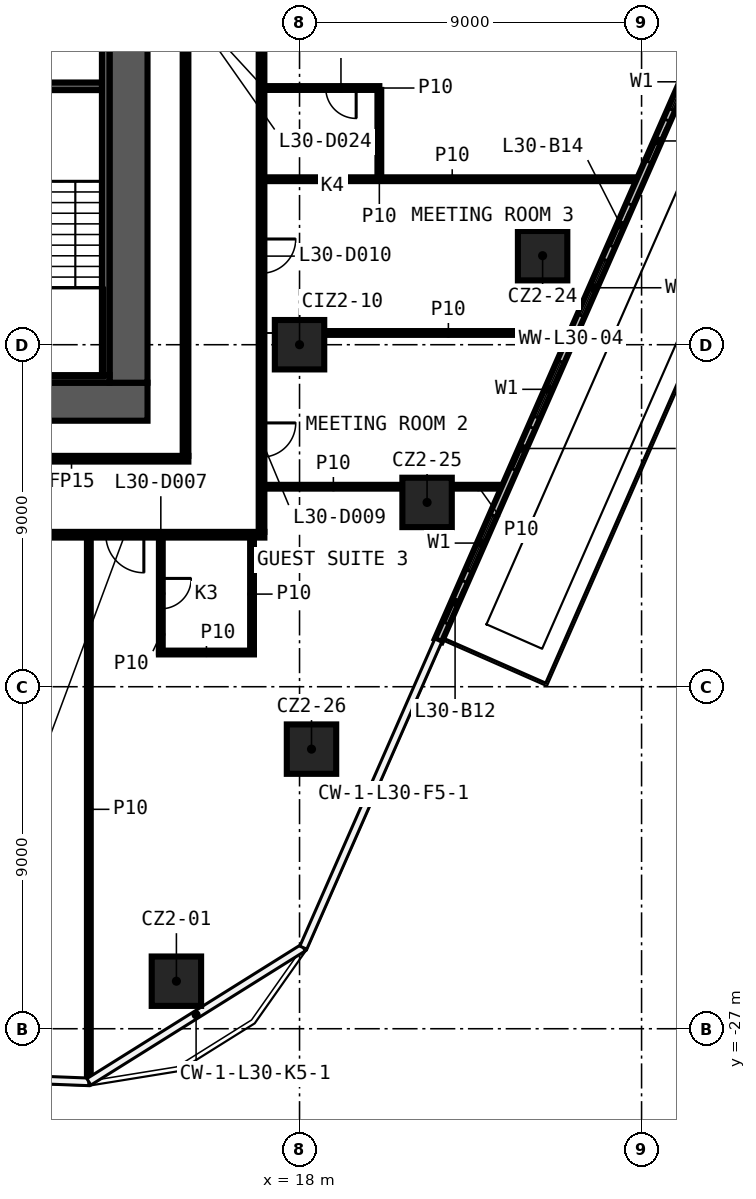
"""IFC4 building model, lengths in metres.
Left out: names, types, materials, properties, quantities, classifications, styles, units other than length and angle.
Written with IfcOpenShell. Run it as: python <this file> out.ifc"""

import sys

from ifc_helpers import new_model, si_unit, direction, frame, frame_2d, origin, origin_2d, place, context, subcontext, project, spatial, rectangle, extrude, element, fill, save


model = new_model("IFC4")
c1 = context("Model", 3, precision=1e-05, world=origin(), true_north=direction((0.0, 1.0)))
c2 = subcontext(c1, "Body", "Model", "MODEL_VIEW")
j1 = project(units=[si_unit("LENGTHUNIT", "METRE"), si_unit("PLANEANGLEUNIT", "RADIAN")], contexts=[c1])
p1 = place(None, origin())
s1 = spatial("IfcSite", under=j1, at=p1, CompositionType="ELEMENT")
p2 = place(p1, origin())
s2 = spatial("IfcBuilding", under=s1, at=p2, CompositionType="ELEMENT")
p3 = place(p2, frame((0.0, 0.0, 135.9)))
s3 = spatial("IfcBuildingStorey", under=s2, at=p3, CompositionType="ELEMENT", Elevation=135.9)
for number, where, z_axis, x_axis in (
    (1, (14.76, -25.749, 0.0), (0.0, 0.0, 1.0), (1.0, 0.0, 0.0)),
    (2, (24.396, -6.657, 0.0), (0.0, 0.0, 1.0), (1.0, 0.0, 0.0)),
    (3, (21.356, -13.15, 0.0), (0.0, 0.0, 1.0), (1.0, 0.0, 0.0)),
    (4, (18.315, -19.642, 0.0), (0.0, 0.0, 1.0), (1.0, 0.0, 0.0)),
    (5, (18.0, -9.0, 0.0), (0.0, 0.0, 1.0), (1.0, 0.0, 0.0)),
):
    element("IfcColumn", number, at=place(p3, frame(where, z_axis=z_axis, x_axis=x_axis)), inside=s3, PredefinedType="COLUMN", context=c2, shape_type="SweptSolid", body=[
        extrude(rectangle(XDim=1.3, YDim=1.3, at=origin_2d()), origin(), (0.0, 0.0, 1.0), 3.3),
    ])
p4 = place(p3, frame((14.3, -17.1, 0.0), z_axis=(0.0, 0.0, 1.0), x_axis=(1.0, 0.0, 0.0)))
e6 = element("IfcWall", 6, at=p4, inside=s3, PredefinedType="PARTITIONING", context=c2, shape_type="SweptSolid", body=[
    extrude(rectangle(XDim=2.5, YDim=0.1, at=frame_2d((1.25, 0.0))), origin(), (0.0, 0.0, 1.0), 3.3),
])
p5 = place(p3, frame((17.075, -14.0, 0.0), z_axis=(0.0, 0.0, 1.0), x_axis=(-1.0, 0.0, 0.0)))
e7 = element("IfcWall", 7, at=p5, inside=s3, PredefinedType="PARTITIONING", context=c2, shape_type="SweptSolid", body=[
    extrude(rectangle(XDim=34.15, YDim=0.15, at=frame_2d((17.075, 0.0))), origin(), (0.0, 0.0, 1.0), 3.3),
])
p6 = place(p5, frame((32.046, 0.0, 0.0)))
e8 = element("IfcOpeningElement", 8, at=p6, cuts=e7, PredefinedType="OPENING", context=c2, shape_type="SweptSolid", body=[
    extrude(rectangle(XDim=0.9, YDim=2.1, at=frame_2d((0.45, 1.05))), frame((0.0, 0.085, 0.0), z_axis=(0.0, -1.0, 0.0), x_axis=(1.0, 0.0, 0.0)), (0.0, 0.0, 1.0), 0.17),
])
p7 = place(p5, frame((24.32, 0.0, 0.0)))
e9 = element("IfcOpeningElement", 9, at=p7, cuts=e7, PredefinedType="OPENING", context=c2, shape_type="SweptSolid", body=[
    extrude(rectangle(XDim=1.0, YDim=2.1, at=frame_2d((0.5, 1.05))), frame((0.0, 0.085, 0.0), z_axis=(0.0, -1.0, 0.0), x_axis=(1.0, 0.0, 0.0)), (0.0, 0.0, 1.0), 0.17),
])
p8 = place(p5, frame((10.847, 0.0, 0.0)))
e10 = element("IfcOpeningElement", 10, at=p8, cuts=e7, PredefinedType="OPENING", context=c2, shape_type="SweptSolid", body=[
    extrude(rectangle(XDim=1.0, YDim=2.1, at=frame_2d((0.5, 1.05))), frame((0.0, 0.085, 0.0), z_axis=(0.0, -1.0, 0.0), x_axis=(1.0, 0.0, 0.0)), (0.0, 0.0, 1.0), 0.17),
])
p9 = place(p5, frame((3.172, 0.0, 0.0)))
e11 = element("IfcOpeningElement", 11, at=p9, cuts=e7, PredefinedType="OPENING", context=c2, shape_type="SweptSolid", body=[
    extrude(rectangle(XDim=1.0, YDim=2.1, at=frame_2d((0.5, 1.05))), frame((0.0, 0.085, 0.0), z_axis=(0.0, -1.0, 0.0), x_axis=(1.0, 0.0, 0.0)), (0.0, 0.0, 1.0), 0.17),
])
p10 = place(p3, frame((17.075, -12.737, 0.0), z_axis=(0.0, 0.0, 1.0), x_axis=(1.0, 0.0, 0.0)))
e12 = element("IfcWall", 12, at=p10, inside=s3, PredefinedType="PARTITIONING", context=c2, shape_type="SweptSolid", body=[
    extrude(rectangle(XDim=3.631, YDim=0.1, at=frame_2d((1.815, 0.0))), origin(), (0.0, 0.0, 1.0), 3.3),
])
p11 = place(p3, frame((22.006, -12.737, 0.0), z_axis=(0.0, 0.0, 1.0), x_axis=(1.0, 0.0, 0.0)))
e13 = element("IfcWall", 13, at=p11, inside=s3, PredefinedType="PARTITIONING", context=c2, shape_type="SweptSolid", body=[
    extrude(rectangle(XDim=1.4, YDim=0.1, at=frame_2d((0.7, 0.0))), origin(), (0.0, 0.0, 1.0), 3.3),
])
p12 = place(p3, frame((8.925, -12.0, 0.0), z_axis=(0.0, 0.0, 1.0), x_axis=(1.0, 0.0, 0.0)))
e14 = element("IfcWall", 14, at=p12, inside=s3, PredefinedType="PARTITIONING", context=c2, shape_type="SweptSolid", body=[
    extrude(rectangle(XDim=6.15, YDim=0.15, at=frame_2d((3.075, 0.0))), origin(), (0.0, 0.0, 1.0), 3.3),
])
p13 = place(p3, frame((18.65, -8.691, 0.0), z_axis=(0.0, 0.0, 1.0), x_axis=(1.0, 0.0, 0.0)))
e15 = element("IfcWall", 15, at=p13, inside=s3, PredefinedType="PARTITIONING", context=c2, shape_type="SweptSolid", body=[
    extrude(rectangle(XDim=6.533, YDim=0.1, at=frame_2d((3.267, 0.0))), origin(), (0.0, 0.0, 1.0), 3.3),
])
p14 = place(p3, frame((17.075, -4.645, 0.0), z_axis=(0.0, 0.0, 1.0), x_axis=(1.0, 0.0, 0.0)))
e16 = element("IfcWall", 16, at=p14, inside=s3, PredefinedType="PARTITIONING", context=c2, shape_type="SweptSolid", body=[
    extrude(rectangle(XDim=9.885, YDim=0.1, at=frame_2d((4.943, 0.0))), origin(), (0.0, 0.0, 1.0), 3.3),
])
p15 = place(p3, frame((20.1, -2.245, 0.0), z_axis=(0.0, 0.0, 1.0), x_axis=(-1.0, 0.0, 0.0)))
e17 = element("IfcWall", 17, at=p15, inside=s3, PredefinedType="PARTITIONING", context=c2, shape_type="SweptSolid", body=[
    extrude(rectangle(XDim=3.025, YDim=0.1, at=frame_2d((1.513, 0.0))), origin(), (0.0, 0.0, 1.0), 3.3),
])
p16 = place(p15, frame((0.61, 0.0, 0.0)))
e18 = element("IfcOpeningElement", 18, at=p16, cuts=e17, PredefinedType="OPENING", context=c2, shape_type="SweptSolid", body=[
    extrude(rectangle(XDim=0.8, YDim=2.1, at=frame_2d((0.4, 1.05))), frame((0.0, 0.06, 0.0), z_axis=(0.0, -1.0, 0.0), x_axis=(1.0, 0.0, 0.0)), (0.0, 0.0, 1.0), 0.12),
])
p17 = place(p3, frame((20.1, -4.595, 0.0), z_axis=(0.0, 0.0, 1.0), x_axis=(0.0, 1.0, 0.0)))
e19 = element("IfcWall", 19, at=p17, inside=s3, PredefinedType="PARTITIONING", context=c2, shape_type="SweptSolid", body=[
    extrude(rectangle(XDim=2.3, YDim=0.1, at=frame_2d((1.15, 0.0))), origin(), (0.0, 0.0, 1.0), 3.3),
])
p18 = place(p3, frame((17.0, 13.925, 0.0), z_axis=(0.0, 0.0, 1.0), x_axis=(0.0, -1.0, 0.0)))
e20 = element("IfcWall", 20, at=p18, inside=s3, PredefinedType="PARTITIONING", context=c2, shape_type="SweptSolid", body=[
    extrude(rectangle(XDim=27.85, YDim=0.15, at=frame_2d((13.925, 0.0))), origin(), (0.0, 0.0, 1.0), 3.3),
])
p19 = place(p18, frame((24.983, 0.0, 0.0)))
e21 = element("IfcOpeningElement", 21, at=p19, cuts=e20, PredefinedType="OPENING", context=c2, shape_type="SweptSolid", body=[
    extrude(rectangle(XDim=0.9, YDim=2.1, at=frame_2d((0.45, 1.05))), frame((0.0, 0.085, 0.0), z_axis=(0.0, -1.0, 0.0), x_axis=(1.0, 0.0, 0.0)), (0.0, 0.0, 1.0), 0.17),
])
p20 = place(p18, frame((20.143, 0.0, 0.0)))
e22 = element("IfcOpeningElement", 22, at=p20, cuts=e20, PredefinedType="OPENING", context=c2, shape_type="SweptSolid", body=[
    extrude(rectangle(XDim=0.9, YDim=2.1, at=frame_2d((0.45, 1.05))), frame((0.0, 0.085, 0.0), z_axis=(0.0, -1.0, 0.0), x_axis=(1.0, 0.0, 0.0)), (0.0, 0.0, 1.0), 0.17),
])
p21 = place(p18, frame((11.054, 0.0, 0.0)))
e23 = element("IfcOpeningElement", 23, at=p21, cuts=e20, PredefinedType="OPENING", context=c2, shape_type="SweptSolid", body=[
    extrude(rectangle(XDim=1.0, YDim=2.1, at=frame_2d((0.5, 1.05))), frame((0.0, 0.085, 0.0), z_axis=(0.0, -1.0, 0.0), x_axis=(1.0, 0.0, 0.0)), (0.0, 0.0, 1.0), 0.17),
])
p22 = place(p18, frame((7.139, 0.0, 0.0)))
e24 = element("IfcOpeningElement", 24, at=p22, cuts=e20, PredefinedType="OPENING", context=c2, shape_type="SweptSolid", body=[
    extrude(rectangle(XDim=0.9, YDim=2.1, at=frame_2d((0.45, 1.05))), frame((0.0, 0.085, 0.0), z_axis=(0.0, -1.0, 0.0), x_axis=(1.0, 0.0, 0.0)), (0.0, 0.0, 1.0), 0.17),
])
p23 = place(p3, frame((16.75, -17.05, 0.0), z_axis=(0.0, 0.0, 1.0), x_axis=(0.0, 1.0, 0.0)))
e25 = element("IfcWall", 25, at=p23, inside=s3, PredefinedType="PARTITIONING", context=c2, shape_type="SweptSolid", body=[
    extrude(rectangle(XDim=2.975, YDim=0.1, at=frame_2d((1.488, 0.0))), origin(), (0.0, 0.0, 1.0), 3.3),
])
p24 = place(p3, frame((15.0, -11.925, 0.0), z_axis=(0.0, 0.0, 1.0), x_axis=(0.0, 1.0, 0.0)))
e26 = element("IfcWall", 26, at=p24, inside=s3, PredefinedType="PARTITIONING", context=c2, shape_type="SweptSolid", body=[
    extrude(rectangle(XDim=23.85, YDim=0.15, at=frame_2d((11.925, 0.0))), origin(), (0.0, 0.0, 1.0), 3.3),
])
p25 = place(p24, frame((11.475, 0.0, 0.0)))
e27 = element("IfcOpeningElement", 27, at=p25, cuts=e26, PredefinedType="OPENING", context=c2, shape_type="SweptSolid", body=[
    extrude(rectangle(XDim=0.9, YDim=2.1, at=frame_2d((0.45, 1.05))), frame((0.0, 0.085, 0.0), z_axis=(0.0, -1.0, 0.0), x_axis=(1.0, 0.0, 0.0)), (0.0, 0.0, 1.0), 0.17),
])
p26 = place(p3, frame((14.35, -14.075, 0.0), z_axis=(0.0, 0.0, 1.0), x_axis=(0.0, -1.0, 0.0)))
e28 = element("IfcWall", 28, at=p26, inside=s3, PredefinedType="PARTITIONING", context=c2, shape_type="SweptSolid", body=[
    extrude(rectangle(XDim=3.025, YDim=0.1, at=frame_2d((1.513, 0.0))), origin(), (0.0, 0.0, 1.0), 3.3),
])
p27 = place(p26, frame((1.075, 0.0, 0.0)))
e29 = element("IfcOpeningElement", 29, at=p27, cuts=e28, PredefinedType="OPENING", context=c2, shape_type="SweptSolid", body=[
    extrude(rectangle(XDim=0.8, YDim=2.1, at=frame_2d((0.4, 1.05))), frame((0.0, 0.06, 0.0), z_axis=(0.0, -1.0, 0.0), x_axis=(1.0, 0.0, 0.0)), (0.0, 0.0, 1.0), 0.12),
])
p28 = place(p3, frame((12.456, -28.378, 0.0), z_axis=(0.0, 0.0, 1.0), x_axis=(0.0, 1.0, 0.0)))
e30 = element("IfcWall", 30, at=p28, inside=s3, PredefinedType="PARTITIONING", context=c2, shape_type="SweptSolid", body=[
    extrude(rectangle(XDim=14.303, YDim=0.1, at=frame_2d((7.151, 0.0))), origin(), (0.0, 0.0, 1.0), 3.3),
])
p29 = place(p3, frame((21.65, -16.783, 0.0), z_axis=(0.0, 0.0, 1.0), x_axis=(0.402171088909, 0.915564533633, 0.0)))
e31 = element("IfcWall", 31, at=p29, inside=s3, PredefinedType="SOLIDWALL", context=c2, shape_type="SweptSolid", body=[
    extrude(rectangle(XDim=17.677, YDim=0.2, at=frame_2d((8.838, 0.0))), origin(), (0.0, 0.0, 1.0), 3.3),
])
p30 = place(p29, frame((2.0, 0.0, 0.6)))
e32 = element("IfcOpeningElement", 32, at=p30, cuts=e31, PredefinedType="OPENING", context=c2, shape_type="SweptSolid", body=[
    extrude(rectangle(XDim=1.6, YDim=2.4, at=frame_2d((0.8, 1.2))), frame((0.0, 0.11, 0.0), z_axis=(0.0, -1.0, 0.0), x_axis=(1.0, 0.0, 0.0)), (0.0, 0.0, 1.0), 0.22),
])
p31 = place(p29, frame((0.5, 0.0, 0.0)))
e33 = element("IfcOpeningElement", 33, at=p31, cuts=e31, PredefinedType="OPENING", context=c2, shape_type="SweptSolid", body=[
    extrude(rectangle(XDim=1.2, YDim=2.4, at=frame_2d((0.6, 1.2))), frame((0.0, 0.11, 0.0), z_axis=(0.0, -1.0, 0.0), x_axis=(1.0, 0.0, 0.0)), (0.0, 0.0, 1.0), 0.22),
])
p32 = place(p29, frame((6.419, 0.0, 0.6)))
e34 = element("IfcOpeningElement", 34, at=p32, cuts=e31, PredefinedType="OPENING", context=c2, shape_type="SweptSolid", body=[
    extrude(rectangle(XDim=1.6, YDim=2.4, at=frame_2d((0.8, 1.2))), frame((0.0, 0.11, 0.0), z_axis=(0.0, -1.0, 0.0), x_axis=(1.0, 0.0, 0.0)), (0.0, 0.0, 1.0), 0.22),
])
p33 = place(p29, frame((4.919, 0.0, 0.0)))
e35 = element("IfcOpeningElement", 35, at=p33, cuts=e31, PredefinedType="OPENING", context=c2, shape_type="SweptSolid", body=[
    extrude(rectangle(XDim=1.2, YDim=2.4, at=frame_2d((0.6, 1.2))), frame((0.0, 0.11, 0.0), z_axis=(0.0, -1.0, 0.0), x_axis=(1.0, 0.0, 0.0)), (0.0, 0.0, 1.0), 0.22),
])
p34 = place(p29, frame((9.338, 0.0, 0.6)))
e36 = element("IfcOpeningElement", 36, at=p34, cuts=e31, PredefinedType="OPENING", context=c2, shape_type="SweptSolid", body=[
    extrude(rectangle(XDim=1.6, YDim=2.4, at=frame_2d((0.8, 1.2))), frame((0.0, 0.11, 0.0), z_axis=(0.0, -1.0, 0.0), x_axis=(1.0, 0.0, 0.0)), (0.0, 0.0, 1.0), 0.22),
])
p35 = place(p29, frame((11.338, 0.0, 0.0)))
e37 = element("IfcOpeningElement", 37, at=p35, cuts=e31, PredefinedType="OPENING", context=c2, shape_type="SweptSolid", body=[
    extrude(rectangle(XDim=1.2, YDim=2.4, at=frame_2d((0.6, 1.2))), frame((0.0, 0.11, 0.0), z_axis=(0.0, -1.0, 0.0), x_axis=(1.0, 0.0, 0.0)), (0.0, 0.0, 1.0), 0.22),
])
p36 = place(p29, frame((15.258, 0.0, 0.6)))
e38 = element("IfcOpeningElement", 38, at=p36, cuts=e31, PredefinedType="OPENING", context=c2, shape_type="SweptSolid", body=[
    extrude(rectangle(XDim=1.6, YDim=2.4, at=frame_2d((0.8, 1.2))), frame((0.0, 0.11, 0.0), z_axis=(0.0, -1.0, 0.0), x_axis=(1.0, 0.0, 0.0)), (0.0, 0.0, 1.0), 0.22),
])
p37 = place(p29, frame((13.758, 0.0, 0.0)))
e39 = element("IfcOpeningElement", 39, at=p37, cuts=e31, PredefinedType="OPENING", context=c2, shape_type="SweptSolid", body=[
    extrude(rectangle(XDim=1.2, YDim=2.4, at=frame_2d((0.6, 1.2))), frame((0.0, 0.11, 0.0), z_axis=(0.0, -1.0, 0.0), x_axis=(1.0, 0.0, 0.0)), (0.0, 0.0, 1.0), 0.22),
])
p38 = place(p3, frame((14.0, -10.5, 0.0), z_axis=(0.0, 0.0, 1.0), x_axis=(-1.0, 0.0, 0.0)))
e40 = element("IfcWall", 40, at=p38, inside=s3, PredefinedType="SHEAR", context=c2, shape_type="SweptSolid", body=[
    extrude(rectangle(XDim=28.0, YDim=1.0, at=frame_2d((14.0, 0.0))), origin(), (0.0, 0.0, 1.0), 3.3),
])
p39 = place(p38, frame((5.1, 0.0, 0.0)))
e41 = element("IfcOpeningElement", 41, at=p39, cuts=e40, PredefinedType="OPENING", context=c2, shape_type="SweptSolid", body=[
    extrude(rectangle(XDim=1.6, YDim=2.1, at=frame_2d((0.8, 1.05))), frame((0.0, 0.51, 0.0), z_axis=(0.0, -1.0, 0.0), x_axis=(1.0, 0.0, 0.0)), (0.0, 0.0, 1.0), 1.02),
])
p40 = place(p3, frame((13.5, 10.0, 0.0), z_axis=(0.0, 0.0, 1.0), x_axis=(0.0, -1.0, 0.0)))
e42 = element("IfcWall", 42, at=p40, inside=s3, PredefinedType="SHEAR", context=c2, shape_type="SweptSolid", body=[
    extrude(rectangle(XDim=20.0, YDim=1.0, at=frame_2d((10.0, 0.0))), origin(), (0.0, 0.0, 1.0), 3.3),
])
p41 = place(p3, frame((13.0, -9.9, 0.0), z_axis=(0.0, 0.0, 1.0), x_axis=(-1.0, 0.0, 0.0)))
e43 = element("IfcWall", 43, at=p41, inside=s3, PredefinedType="SHEAR", context=c2, shape_type="SweptSolid", body=[
    extrude(rectangle(XDim=3.7, YDim=0.2, at=frame_2d((1.85, 0.0))), origin(), (0.0, 0.0, 1.0), 3.3),
])
p42 = place(p3, frame((12.9, 9.8, 0.0), z_axis=(0.0, 0.0, 1.0), x_axis=(0.0, -1.0, 0.0)))
e44 = element("IfcWall", 44, at=p42, inside=s3, PredefinedType="SHEAR", context=c2, shape_type="SweptSolid", body=[
    extrude(rectangle(XDim=19.6, YDim=0.2, at=frame_2d((9.8, 0.0))), origin(), (0.0, 0.0, 1.0), 3.3),
])
p43 = place(p3, frame((9.45, -2.2, 0.0), z_axis=(0.0, 0.0, 1.0), x_axis=(1.0, 0.0, 0.0)))
e45 = element("IfcWall", 45, at=p43, inside=s3, PredefinedType="SHEAR", context=c2, shape_type="SweptSolid", body=[
    extrude(rectangle(XDim=3.35, YDim=0.2, at=frame_2d((1.675, 0.0))), origin(), (0.0, 0.0, 1.0), 3.3),
])
p44 = place(p27, origin())
e46 = element("IfcDoor", 46, at=p44, inside=s3, OperationType="SINGLE_SWING_RIGHT", PredefinedType="DOOR", context=c2, shape_type="SweptSolid", body=[
    extrude(rectangle(XDim=0.8, YDim=2.1, at=frame_2d((0.4, 1.05))), frame((0.0, 0.025, 0.0), z_axis=(0.0, -1.0, 0.0), x_axis=(1.0, 0.0, 0.0)), (0.0, 0.0, 1.0), 0.05),
])
fill(e29, e46)
p45 = place(p9, origin())
e47 = element("IfcDoor", 47, at=p45, inside=s3, OperationType="SINGLE_SWING_LEFT", PredefinedType="DOOR", context=c2, shape_type="SweptSolid", body=[
    extrude(rectangle(XDim=1.0, YDim=2.1, at=frame_2d((0.5, 1.05))), frame((0.0, 0.025, 0.0), z_axis=(0.0, -1.0, 0.0), x_axis=(1.0, 0.0, 0.0)), (0.0, 0.0, 1.0), 0.05),
])
fill(e11, e47)
p46 = place(p19, origin())
e48 = element("IfcDoor", 48, at=p46, inside=s3, OperationType="SINGLE_SWING_RIGHT", PredefinedType="DOOR", context=c2, shape_type="SweptSolid", body=[
    extrude(rectangle(XDim=0.9, YDim=2.1, at=frame_2d((0.45, 1.05))), frame((0.0, 0.025, 0.0), z_axis=(0.0, -1.0, 0.0), x_axis=(1.0, 0.0, 0.0)), (0.0, 0.0, 1.0), 0.05),
])
fill(e21, e48)
p47 = place(p20, origin())
e49 = element("IfcDoor", 49, at=p47, inside=s3, OperationType="SINGLE_SWING_LEFT", PredefinedType="DOOR", context=c2, shape_type="SweptSolid", body=[
    extrude(rectangle(XDim=0.9, YDim=2.1, at=frame_2d((0.45, 1.05))), frame((0.0, 0.025, 0.0), z_axis=(0.0, -1.0, 0.0), x_axis=(1.0, 0.0, 0.0)), (0.0, 0.0, 1.0), 0.05),
])
fill(e22, e49)
p48 = place(p16, origin())
e50 = element("IfcDoor", 50, at=p48, inside=s3, OperationType="SINGLE_SWING_LEFT", PredefinedType="DOOR", context=c2, shape_type="SweptSolid", body=[
    extrude(rectangle(XDim=0.8, YDim=2.1, at=frame_2d((0.4, 1.05))), frame((0.0, 0.025, 0.0), z_axis=(0.0, -1.0, 0.0), x_axis=(1.0, 0.0, 0.0)), (0.0, 0.0, 1.0), 0.05),
])
fill(e18, e50)
p49 = place(p30, origin())
e51 = element("IfcWindow", 51, at=p49, inside=s3, PartitioningType="SINGLE_PANEL", PredefinedType="WINDOW", context=c2, shape_type="SweptSolid", body=[
    extrude(rectangle(XDim=1.6, YDim=2.4, at=frame_2d((0.8, 1.2))), frame((0.0, 0.03, 0.0), z_axis=(0.0, -1.0, 0.0), x_axis=(1.0, 0.0, 0.0)), (0.0, 0.0, 1.0), 0.06),
])
fill(e32, e51)
p50 = place(p31, origin())
e52 = element("IfcDoor", 52, at=p50, inside=s3, OperationType="SLIDING_TO_LEFT", PredefinedType="DOOR", context=c2, shape_type="SweptSolid", body=[
    extrude(rectangle(XDim=1.2, YDim=2.4, at=frame_2d((0.6, 1.2))), frame((0.0, 0.025, 0.0), z_axis=(0.0, -1.0, 0.0), x_axis=(1.0, 0.0, 0.0)), (0.0, 0.0, 1.0), 0.05),
])
fill(e33, e52)
p51 = place(p32, origin())
e53 = element("IfcWindow", 53, at=p51, inside=s3, PartitioningType="SINGLE_PANEL", PredefinedType="WINDOW", context=c2, shape_type="SweptSolid", body=[
    extrude(rectangle(XDim=1.6, YDim=2.4, at=frame_2d((0.8, 1.2))), frame((0.0, 0.03, 0.0), z_axis=(0.0, -1.0, 0.0), x_axis=(1.0, 0.0, 0.0)), (0.0, 0.0, 1.0), 0.06),
])
fill(e34, e53)
p52 = place(p33, origin())
e54 = element("IfcDoor", 54, at=p52, inside=s3, OperationType="SLIDING_TO_LEFT", PredefinedType="DOOR", context=c2, shape_type="SweptSolid", body=[
    extrude(rectangle(XDim=1.2, YDim=2.4, at=frame_2d((0.6, 1.2))), frame((0.0, 0.025, 0.0), z_axis=(0.0, -1.0, 0.0), x_axis=(1.0, 0.0, 0.0)), (0.0, 0.0, 1.0), 0.05),
])
fill(e35, e54)
p53 = place(p34, origin())
e55 = element("IfcWindow", 55, at=p53, inside=s3, PartitioningType="SINGLE_PANEL", PredefinedType="WINDOW", context=c2, shape_type="SweptSolid", body=[
    extrude(rectangle(XDim=1.6, YDim=2.4, at=frame_2d((0.8, 1.2))), frame((0.0, 0.03, 0.0), z_axis=(0.0, -1.0, 0.0), x_axis=(1.0, 0.0, 0.0)), (0.0, 0.0, 1.0), 0.06),
])
fill(e36, e55)
p54 = place(p35, origin())
e56 = element("IfcDoor", 56, at=p54, inside=s3, OperationType="SLIDING_TO_LEFT", PredefinedType="DOOR", context=c2, shape_type="SweptSolid", body=[
    extrude(rectangle(XDim=1.2, YDim=2.4, at=frame_2d((0.6, 1.2))), frame((0.0, 0.025, 0.0), z_axis=(0.0, -1.0, 0.0), x_axis=(1.0, 0.0, 0.0)), (0.0, 0.0, 1.0), 0.05),
])
fill(e37, e56)
p55 = place(p36, origin())
e57 = element("IfcWindow", 57, at=p55, inside=s3, PartitioningType="SINGLE_PANEL", PredefinedType="WINDOW", context=c2, shape_type="SweptSolid", body=[
    extrude(rectangle(XDim=1.6, YDim=2.4, at=frame_2d((0.8, 1.2))), frame((0.0, 0.03, 0.0), z_axis=(0.0, -1.0, 0.0), x_axis=(1.0, 0.0, 0.0)), (0.0, 0.0, 1.0), 0.06),
])
fill(e38, e57)
p56 = place(p37, origin())
e58 = element("IfcDoor", 58, at=p56, inside=s3, OperationType="SLIDING_TO_LEFT", PredefinedType="DOOR", context=c2, shape_type="SweptSolid", body=[
    extrude(rectangle(XDim=1.2, YDim=2.4, at=frame_2d((0.6, 1.2))), frame((0.0, 0.025, 0.0), z_axis=(0.0, -1.0, 0.0), x_axis=(1.0, 0.0, 0.0)), (0.0, 0.0, 1.0), 0.05),
])
fill(e39, e58)
save(model, sys.argv[1])
